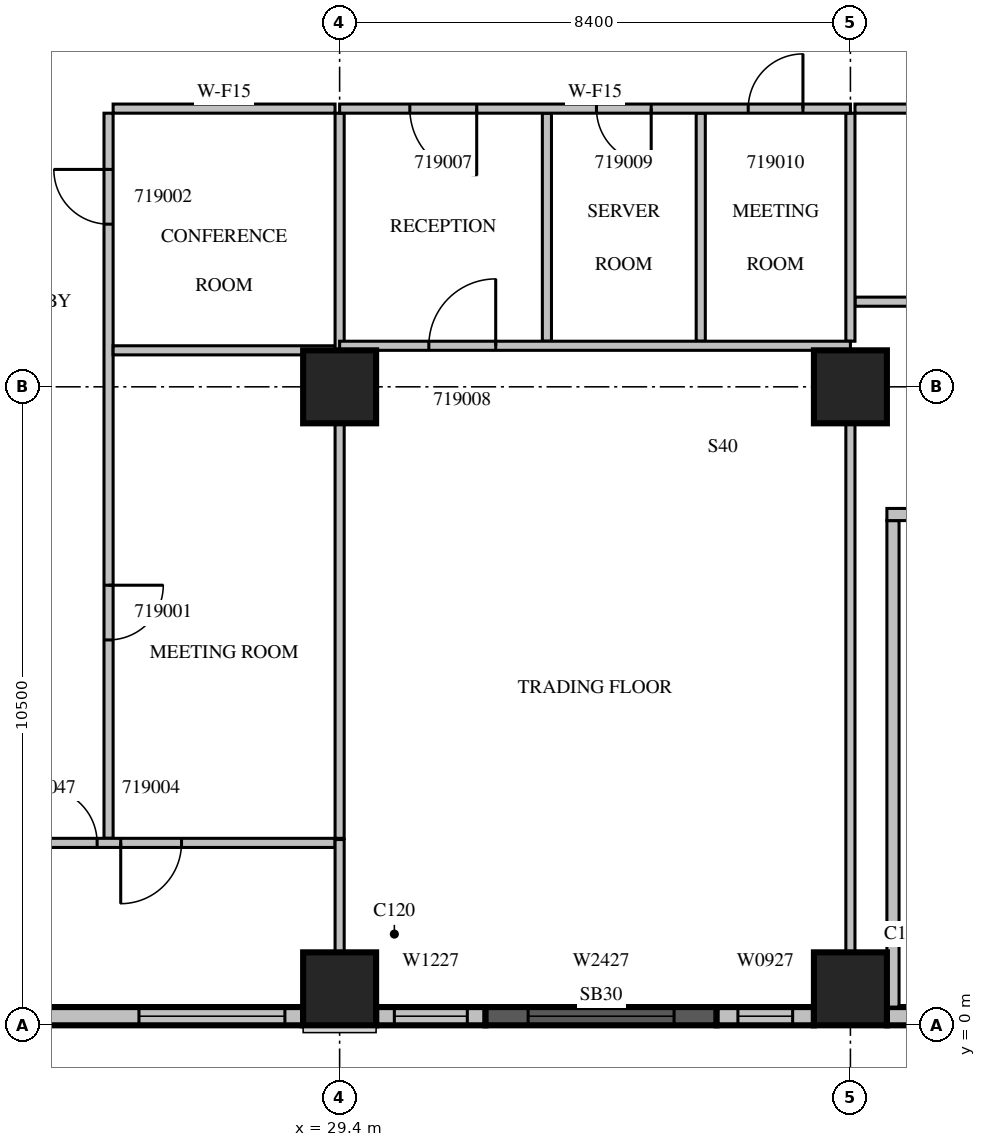
"""IFC4 building model, lengths in metres.
Left out: names, types, materials, properties, quantities, classifications, styles, units other than length and angle.
Written with IfcOpenShell. Run it as: python <this file> out.ifc"""

import sys

from ifc_helpers import new_model, si_unit, direction, frame, frame_2d, origin, origin_2d, place, context, subcontext, project, spatial, rectangle, extrude, source, transform, mapped, element, fill, save


model = new_model("IFC4")
c1 = context("Model", 3, precision=1e-05, world=origin(), true_north=direction((0.0, 1.0)))
c2 = subcontext(c1, "Body", "Model", "MODEL_VIEW")
j1 = project(units=[si_unit("LENGTHUNIT", "METRE"), si_unit("PLANEANGLEUNIT", "RADIAN")], contexts=[c1])
p1 = place(None, origin())
s1 = spatial("IfcSite", under=j1, at=p1, CompositionType="ELEMENT")
p2 = place(p1, origin())
s2 = spatial("IfcBuilding", under=s1, at=p2, CompositionType="ELEMENT")
p3 = place(p2, frame((0.0, 0.0, 90.9)))
s3 = spatial("IfcBuildingStorey", under=s2, at=p3, CompositionType="ELEMENT", Elevation=90.9)
m1 = source(origin(), c2, "Body", "SweptSolid", [
    extrude(rectangle(XDim=1.2, YDim=1.2, at=origin_2d()), origin(), (0.0, 0.0, 1.0), 4.2),
])
for number, where, z_axis, x_axis in (
    (1, (29.4, 0.6, 0.0), (0.0, 0.0, 1.0), (1.0, 0.0, 0.0)),
    (2, (37.8, 0.6, 0.0), (0.0, 0.0, 1.0), (1.0, 0.0, 0.0)),
    (3, (29.4, 10.5, 0.0), (0.0, 0.0, 1.0), (1.0, 0.0, 0.0)),
    (4, (37.8, 10.5, 0.0), (0.0, 0.0, 1.0), (1.0, 0.0, 0.0)),
):
    element("IfcColumn", number, at=place(p3, frame(where, z_axis=z_axis, x_axis=x_axis)), inside=s3, PredefinedType="COLUMN", context=c2, shape_type="MappedRepresentation", body=[
        mapped(m1, transform((0.0, 0.0, 0.0), scale=1.0)),
    ])
m2 = source(origin(), c2, "Body", "SweptSolid", [
    extrude(rectangle(XDim=7.2, YDim=0.3, at=frame_2d((3.6, 0.0))), origin(), (0.0, 0.0, 1.0), 3.8),
])
p4 = place(p3, frame((21.6, 0.15, 0.0), z_axis=(0.0, 0.0, 1.0), x_axis=(1.0, 0.0, 0.0)))
e5 = element("IfcWall", 5, at=p4, inside=s3, PredefinedType="STANDARD", context=c2, shape_type="MappedRepresentation", body=[
    mapped(m2, transform((0.0, 0.0, 0.0), scale=1.0)),
])
m3 = source(origin(), c2, "Body", "SweptSolid", [
    extrude(rectangle(XDim=2.4, YDim=2.7, at=frame_2d((1.2, 1.35))), frame((0.0, 0.16, 0.0), z_axis=(0.0, -1.0, 0.0), x_axis=(1.0, 0.0, 0.0)), (0.0, 0.0, 1.0), 0.32),
])
p5 = place(p4, frame((0.3, 0.0, 0.6)))
e6 = element("IfcOpeningElement", 6, at=p5, cuts=e5, PredefinedType="OPENING", context=c2, shape_type="MappedRepresentation", body=[
    mapped(m3, transform((0.0, 0.0, 0.0), scale=1.0)),
])
p6 = place(p4, frame((4.5, 0.0, 0.6)))
e7 = element("IfcOpeningElement", 7, at=p6, cuts=e5, PredefinedType="OPENING", context=c2, shape_type="MappedRepresentation", body=[
    mapped(m3, transform((0.0, 0.0, 0.0), scale=1.0)),
])
m4 = source(origin(), c2, "Body", "SweptSolid", [
    extrude(rectangle(XDim=1.8, YDim=0.3, at=frame_2d((0.9, 0.0))), origin(), (0.0, 0.0, 1.0), 3.8),
])
p7 = place(p3, frame((30.0, 0.15, 0.0), z_axis=(0.0, 0.0, 1.0), x_axis=(1.0, 0.0, 0.0)))
e8 = element("IfcWall", 8, at=p7, inside=s3, PredefinedType="STANDARD", context=c2, shape_type="MappedRepresentation", body=[
    mapped(m4, transform((0.0, 0.0, 0.0), scale=1.0)),
])
m5 = source(origin(), c2, "Body", "SweptSolid", [
    extrude(rectangle(XDim=1.2, YDim=2.7, at=frame_2d((0.6, 1.35))), frame((0.0, 0.16, 0.0), z_axis=(0.0, -1.0, 0.0), x_axis=(1.0, 0.0, 0.0)), (0.0, 0.0, 1.0), 0.32),
])
p8 = place(p7, frame((0.3, 0.0, 0.6)))
e9 = element("IfcOpeningElement", 9, at=p8, cuts=e8, PredefinedType="OPENING", context=c2, shape_type="MappedRepresentation", body=[
    mapped(m5, transform((0.0, 0.0, 0.0), scale=1.0)),
])
m6 = source(origin(), c2, "Body", "SweptSolid", [
    extrude(rectangle(XDim=3.8, YDim=0.3, at=frame_2d((1.9, 0.0))), origin(), (0.0, 0.0, 1.0), 3.8),
])
p9 = place(p3, frame((31.8, 0.15, 0.0), z_axis=(0.0, 0.0, 1.0), x_axis=(1.0, 0.0, 0.0)))
e10 = element("IfcWall", 10, at=p9, inside=s3, PredefinedType="SOLIDWALL", context=c2, shape_type="MappedRepresentation", body=[
    mapped(m6, transform((0.0, 0.0, 0.0), scale=1.0)),
])
p10 = place(p9, frame((0.7, 0.0, 0.6)))
e11 = element("IfcOpeningElement", 11, at=p10, cuts=e10, PredefinedType="OPENING", context=c2, shape_type="MappedRepresentation", body=[
    mapped(m3, transform((0.0, 0.0, 0.0), scale=1.0)),
])
m7 = source(origin(), c2, "Body", "SweptSolid", [
    extrude(rectangle(XDim=1.6, YDim=0.3, at=frame_2d((0.8, 0.0))), origin(), (0.0, 0.0, 1.0), 3.8),
])
p11 = place(p3, frame((35.6, 0.15, 0.0), z_axis=(0.0, 0.0, 1.0), x_axis=(1.0, 0.0, 0.0)))
e12 = element("IfcWall", 12, at=p11, inside=s3, PredefinedType="STANDARD", context=c2, shape_type="MappedRepresentation", body=[
    mapped(m7, transform((0.0, 0.0, 0.0), scale=1.0)),
])
m8 = source(origin(), c2, "Body", "SweptSolid", [
    extrude(rectangle(XDim=0.9, YDim=2.7, at=frame_2d((0.45, 1.35))), frame((0.0, 0.16, 0.0), z_axis=(0.0, -1.0, 0.0), x_axis=(1.0, 0.0, 0.0)), (0.0, 0.0, 1.0), 0.32),
])
p12 = place(p11, frame((0.35, 0.0, 0.6)))
e13 = element("IfcOpeningElement", 13, at=p12, cuts=e12, PredefinedType="OPENING", context=c2, shape_type="MappedRepresentation", body=[
    mapped(m8, transform((0.0, 0.0, 0.0), scale=1.0)),
])
p13 = place(p3, frame((38.4, 0.15, 0.0), z_axis=(0.0, 0.0, 1.0), x_axis=(1.0, 0.0, 0.0)))
e14 = element("IfcWall", 14, at=p13, inside=s3, PredefinedType="STANDARD", context=c2, shape_type="MappedRepresentation", body=[
    mapped(m4, transform((0.0, 0.0, 0.0), scale=1.0)),
])
m9 = source(origin(), c2, "Body", "SweptSolid", [
    extrude(rectangle(XDim=8.0, YDim=0.2, at=frame_2d((4.0, 0.0))), origin(), (0.0, 0.0, 1.0), 3.8),
])
p14 = place(p3, frame((38.5, 0.3, 0.0), z_axis=(0.0, 0.0, 1.0), x_axis=(0.0, 1.0, 0.0)))
e15 = element("IfcWall", 15, at=p14, inside=s3, PredefinedType="PARTITIONING", context=c2, shape_type="MappedRepresentation", body=[
    mapped(m9, transform((0.0, 0.0, 0.0), scale=1.0)),
])
m10 = source(origin(), c2, "Body", "SweptSolid", [
    extrude(rectangle(XDim=5.45, YDim=0.2, at=frame_2d((2.725, 0.0))), origin(), (0.0, 0.0, 1.0), 3.8),
])
p15 = place(p3, frame((38.4, 8.4, 0.0), z_axis=(0.0, 0.0, 1.0), x_axis=(1.0, 0.0, 0.0)))
e16 = element("IfcWall", 16, at=p15, inside=s3, PredefinedType="PARTITIONING", context=c2, shape_type="MappedRepresentation", body=[
    mapped(m10, transform((0.0, 0.0, 0.0), scale=1.0)),
])
m11 = source(origin(), c2, "Body", "SweptSolid", [
    extrude(rectangle(XDim=1.2, YDim=2.1, at=frame_2d((0.6, 1.05))), frame((0.0, 0.11, 0.0), z_axis=(0.0, -1.0, 0.0), x_axis=(1.0, 0.0, 0.0)), (0.0, 0.0, 1.0), 0.22),
])
p16 = place(p15, frame((0.4, 0.0, 0.0)))
e17 = element("IfcOpeningElement", 17, at=p16, cuts=e16, PredefinedType="OPENING", context=c2, shape_type="MappedRepresentation", body=[
    mapped(m11, transform((0.0, 0.0, 0.0), scale=1.0)),
])
m12 = source(origin(), c2, "Body", "SweptSolid", [
    extrude(rectangle(XDim=0.9, YDim=2.1, at=frame_2d((0.45, 1.05))), frame((0.0, 0.11, 0.0), z_axis=(0.0, -1.0, 0.0), x_axis=(1.0, 0.0, 0.0)), (0.0, 0.0, 1.0), 0.22),
])
p17 = place(p15, frame((3.25, 0.0, 0.0)))
e18 = element("IfcOpeningElement", 18, at=p17, cuts=e16, PredefinedType="OPENING", context=c2, shape_type="MappedRepresentation", body=[
    mapped(m12, transform((0.0, 0.0, 0.0), scale=1.0)),
])
m13 = source(origin(), c2, "Body", "SweptSolid", [
    extrude(rectangle(XDim=11.925, YDim=0.15, at=frame_2d((5.963, 0.0))), origin(), (0.0, 0.0, 1.0), 3.8),
])
p18 = place(p3, frame((25.6, 15.0, 0.0), z_axis=(0.0, 0.0, 1.0), x_axis=(0.0, -1.0, 0.0)))
e19 = element("IfcWall", 19, at=p18, inside=s3, PredefinedType="PARTITIONING", context=c2, shape_type="MappedRepresentation", body=[
    mapped(m13, transform((0.0, 0.0, 0.0), scale=1.0)),
])
m14 = source(origin(), c2, "Body", "SweptSolid", [
    extrude(rectangle(XDim=0.9, YDim=2.1, at=frame_2d((0.45, 1.05))), frame((0.0, 0.085, 0.0), z_axis=(0.0, -1.0, 0.0), x_axis=(1.0, 0.0, 0.0)), (0.0, 0.0, 1.0), 0.17),
])
p19 = place(p18, frame((7.763, 0.0, 0.0)))
e20 = element("IfcOpeningElement", 20, at=p19, cuts=e19, PredefinedType="OPENING", context=c2, shape_type="MappedRepresentation", body=[
    mapped(m14, transform((0.0, 0.0, 0.0), scale=1.0)),
])
p20 = place(p18, frame((0.925, 0.0, 0.0)))
e21 = element("IfcOpeningElement", 21, at=p20, cuts=e19, PredefinedType="OPENING", context=c2, shape_type="MappedRepresentation", body=[
    mapped(m14, transform((0.0, 0.0, 0.0), scale=1.0)),
])
p21 = place(p3, frame((29.325, 11.1, 0.0), z_axis=(0.0, 0.0, 1.0), x_axis=(-1.0, 0.0, 0.0)))
e22 = element("IfcWall", 22, at=p21, inside=s3, PredefinedType="PARTITIONING", context=c2, shape_type="SweptSolid", body=[
    extrude(rectangle(XDim=3.65, YDim=0.15, at=frame_2d((1.825, 0.0))), origin(), (0.0, 0.0, 1.0), 3.8),
])
m15 = source(origin(), c2, "Body", "SweptSolid", [
    extrude(rectangle(XDim=3.65, YDim=0.15, at=frame_2d((1.825, 0.0))), origin(), (0.0, 0.0, 1.0), 3.8),
])
p22 = place(p3, frame((29.325, 15.075, 0.0), z_axis=(0.0, 0.0, 1.0), x_axis=(-1.0, 0.0, 0.0)))
e23 = element("IfcWall", 23, at=p22, inside=s3, PredefinedType="PARTITIONING", context=c2, shape_type="MappedRepresentation", body=[
    mapped(m15, transform((0.0, 0.0, 0.0), scale=1.0)),
])
m16 = source(origin(), c2, "Body", "SweptSolid", [
    extrude(rectangle(XDim=6.826, YDim=0.15, at=frame_2d((3.413, 0.0))), origin(), (0.0, 0.0, 1.0), 3.8),
])
p23 = place(p3, frame((29.4, 3.075, 0.0), z_axis=(0.0, 0.0, 1.0), x_axis=(0.0, 1.0, 0.0)))
e24 = element("IfcWall", 24, at=p23, inside=s3, PredefinedType="PARTITIONING", context=c2, shape_type="MappedRepresentation", body=[
    mapped(m16, transform((0.0, 0.0, 0.0), scale=1.0)),
])
m17 = source(origin(), c2, "Body", "SweptSolid", [
    extrude(rectangle(XDim=3.901, YDim=0.15, at=frame_2d((1.95, 0.0))), origin(), (0.0, 0.0, 1.0), 3.8),
])
p24 = place(p3, frame((29.4, 11.099, 0.0), z_axis=(0.0, 0.0, 1.0), x_axis=(0.0, 1.0, 0.0)))
e25 = element("IfcWall", 25, at=p24, inside=s3, PredefinedType="PARTITIONING", context=c2, shape_type="MappedRepresentation", body=[
    mapped(m17, transform((0.0, 0.0, 0.0), scale=1.0)),
])
m18 = source(origin(), c2, "Body", "SweptSolid", [
    extrude(rectangle(XDim=7.125, YDim=0.15, at=frame_2d((3.562, 0.0))), origin(), (0.0, 0.0, 1.0), 3.8),
])
p25 = place(p3, frame((22.2, 3.0, 0.0), z_axis=(0.0, 0.0, 1.0), x_axis=(1.0, 0.0, 0.0)))
e26 = element("IfcWall", 26, at=p25, inside=s3, PredefinedType="PARTITIONING", context=c2, shape_type="MappedRepresentation", body=[
    mapped(m18, transform((0.0, 0.0, 0.0), scale=1.0)),
])
m19 = source(origin(), c2, "Body", "SweptSolid", [
    extrude(rectangle(XDim=1.0, YDim=2.1, at=frame_2d((0.5, 1.05))), frame((0.0, 0.085, 0.0), z_axis=(0.0, -1.0, 0.0), x_axis=(1.0, 0.0, 0.0)), (0.0, 0.0, 1.0), 0.17),
])
p26 = place(p25, frame((3.6, 0.0, 0.0)))
e27 = element("IfcOpeningElement", 27, at=p26, cuts=e26, PredefinedType="OPENING", context=c2, shape_type="MappedRepresentation", body=[
    mapped(m19, transform((0.0, 0.0, 0.0), scale=1.0)),
])
p27 = place(p25, frame((2.312, 0.0, 0.0)))
e28 = element("IfcOpeningElement", 28, at=p27, cuts=e26, PredefinedType="OPENING", context=c2, shape_type="MappedRepresentation", body=[
    mapped(m14, transform((0.0, 0.0, 0.0), scale=1.0)),
])
m20 = source(origin(), c2, "Body", "SweptSolid", [
    extrude(rectangle(XDim=6.45, YDim=0.15, at=frame_2d((3.225, 0.0))), origin(), (0.0, 0.0, 1.0), 3.8),
])
p28 = place(p3, frame((37.875, 11.9, 0.0), z_axis=(0.0, 0.0, 1.0), x_axis=(1.0, 0.0, 0.0)))
e29 = element("IfcWall", 29, at=p28, inside=s3, PredefinedType="PARTITIONING", context=c2, shape_type="MappedRepresentation", body=[
    mapped(m20, transform((0.0, 0.0, 0.0), scale=1.0)),
])
p29 = place(p3, frame((44.325, 15.075, 0.0), z_axis=(0.0, 0.0, 1.0), x_axis=(-1.0, 0.0, 0.0)))
e30 = element("IfcWall", 30, at=p29, inside=s3, PredefinedType="PARTITIONING", context=c2, shape_type="MappedRepresentation", body=[
    mapped(m20, transform((0.0, 0.0, 0.0), scale=1.0)),
])
p30 = place(p29, frame((2.812, 0.0, 0.0)))
e31 = element("IfcOpeningElement", 31, at=p30, cuts=e30, PredefinedType="OPENING", context=c2, shape_type="MappedRepresentation", body=[
    mapped(m14, transform((0.0, 0.0, 0.0), scale=1.0)),
])
m21 = source(origin(), c2, "Body", "SweptSolid", [
    extrude(rectangle(XDim=3.75, YDim=0.15, at=frame_2d((1.875, 0.0))), origin(), (0.0, 0.0, 1.0), 3.8),
])
for number, where, z_axis, x_axis in (
    (32, (32.809, 11.25, 0.0), (0.0, 0.0, 1.0), (0.0, 1.0, 0.0)),
    (33, (35.339, 11.25, 0.0), (0.0, 0.0, 1.0), (0.0, 1.0, 0.0)),
):
    element("IfcWall", number, at=place(p3, frame(where, z_axis=z_axis, x_axis=x_axis)), inside=s3, PredefinedType="PARTITIONING", context=c2, shape_type="MappedRepresentation", body=[
        mapped(m21, transform((0.0, 0.0, 0.0), scale=1.0)),
    ])
m22 = source(origin(), c2, "Body", "SweptSolid", [
    extrude(rectangle(XDim=1.856, YDim=0.15, at=frame_2d((0.928, 0.0))), origin(), (0.0, 0.0, 1.0), 3.8),
])
p31 = place(p3, frame((29.4, 1.199, 0.0), z_axis=(0.0, 0.0, 1.0), x_axis=(0.0, 1.0, 0.0)))
e34 = element("IfcWall", 34, at=p31, inside=s3, PredefinedType="PARTITIONING", context=c2, shape_type="MappedRepresentation", body=[
    mapped(m22, transform((0.0, 0.0, 0.0), scale=1.0)),
])
m23 = source(origin(), c2, "Body", "SweptSolid", [
    extrude(rectangle(XDim=8.702, YDim=0.15, at=frame_2d((4.351, 0.0))), origin(), (0.0, 0.0, 1.0), 3.8),
])
p32 = place(p3, frame((37.8, 1.199, 0.0), z_axis=(0.0, 0.0, 1.0), x_axis=(0.0, 1.0, 0.0)))
e35 = element("IfcWall", 35, at=p32, inside=s3, PredefinedType="PARTITIONING", context=c2, shape_type="MappedRepresentation", body=[
    mapped(m23, transform((0.0, 0.0, 0.0), scale=1.0)),
])
p33 = place(p3, frame((37.8, 11.25, 0.0), z_axis=(0.0, 0.0, 1.0), x_axis=(0.0, 1.0, 0.0)))
e36 = element("IfcWall", 36, at=p33, inside=s3, PredefinedType="PARTITIONING", context=c2, shape_type="MappedRepresentation", body=[
    mapped(m21, transform((0.0, 0.0, 0.0), scale=1.0)),
])
m24 = source(origin(), c2, "Body", "SweptSolid", [
    extrude(rectangle(XDim=8.4, YDim=0.15, at=frame_2d((4.2, 0.0))), origin(), (0.0, 0.0, 1.0), 3.8),
])
p34 = place(p3, frame((37.8, 11.175, 0.0), z_axis=(0.0, 0.0, 1.0), x_axis=(-1.0, 0.0, 0.0)))
e37 = element("IfcWall", 37, at=p34, inside=s3, PredefinedType="PARTITIONING", context=c2, shape_type="MappedRepresentation", body=[
    mapped(m24, transform((0.0, 0.0, 0.0), scale=1.0)),
])
m25 = source(origin(), c2, "Body", "SweptSolid", [
    extrude(rectangle(XDim=1.1, YDim=2.1, at=frame_2d((0.55, 1.05))), frame((0.0, 0.085, 0.0), z_axis=(0.0, -1.0, 0.0), x_axis=(1.0, 0.0, 0.0)), (0.0, 0.0, 1.0), 0.17),
])
p35 = place(p34, frame((5.833, 0.0, 0.0)))
e38 = element("IfcOpeningElement", 38, at=p35, cuts=e37, PredefinedType="OPENING", context=c2, shape_type="MappedRepresentation", body=[
    mapped(m25, transform((0.0, 0.0, 0.0), scale=1.0)),
])
p36 = place(p3, frame((37.8, 15.075, 0.0), z_axis=(0.0, 0.0, 1.0), x_axis=(-1.0, 0.0, 0.0)))
e39 = element("IfcWall", 39, at=p36, inside=s3, PredefinedType="PARTITIONING", context=c2, shape_type="MappedRepresentation", body=[
    mapped(m24, transform((0.0, 0.0, 0.0), scale=1.0)),
])
p37 = place(p36, frame((6.146, 0.0, 0.0)))
e40 = element("IfcOpeningElement", 40, at=p37, cuts=e39, PredefinedType="OPENING", context=c2, shape_type="MappedRepresentation", body=[
    mapped(m25, transform((0.0, 0.0, 0.0), scale=1.0)),
])
p38 = place(p36, frame((3.276, 0.0, 0.0)))
e41 = element("IfcOpeningElement", 41, at=p38, cuts=e39, PredefinedType="OPENING", context=c2, shape_type="MappedRepresentation", body=[
    mapped(m14, transform((0.0, 0.0, 0.0), scale=1.0)),
])
p39 = place(p36, frame((0.781, 0.0, 0.0)))
e42 = element("IfcOpeningElement", 42, at=p39, cuts=e39, PredefinedType="OPENING", context=c2, shape_type="MappedRepresentation", body=[
    mapped(m14, transform((0.0, 0.0, 0.0), scale=1.0)),
])
m26 = source(origin(), c2, "Body", "SweptSolid", [
    extrude(rectangle(XDim=2.4, YDim=2.7, at=frame_2d((1.2, 1.35))), frame((0.0, 0.03, 0.0), z_axis=(0.0, -1.0, 0.0), x_axis=(1.0, 0.0, 0.0)), (0.0, 0.0, 1.0), 0.06),
])
p40 = place(p6, origin())
e43 = element("IfcWindow", 43, at=p40, inside=s3, PartitioningType="SINGLE_PANEL", PredefinedType="WINDOW", context=c2, shape_type="MappedRepresentation", body=[
    mapped(m26, transform((0.0, 0.0, 0.0), scale=1.0)),
])
fill(e7, e43)
m27 = source(origin(), c2, "Body", "SweptSolid", [
    extrude(rectangle(XDim=1.2, YDim=2.7, at=frame_2d((0.6, 1.35))), frame((0.0, 0.03, 0.0), z_axis=(0.0, -1.0, 0.0), x_axis=(1.0, 0.0, 0.0)), (0.0, 0.0, 1.0), 0.06),
])
p41 = place(p8, origin())
e44 = element("IfcWindow", 44, at=p41, inside=s3, PartitioningType="SINGLE_PANEL", PredefinedType="WINDOW", context=c2, shape_type="MappedRepresentation", body=[
    mapped(m27, transform((0.0, 0.0, 0.0), scale=1.0)),
])
fill(e9, e44)
p42 = place(p10, origin())
e45 = element("IfcWindow", 45, at=p42, inside=s3, PartitioningType="SINGLE_PANEL", PredefinedType="WINDOW", context=c2, shape_type="MappedRepresentation", body=[
    mapped(m26, transform((0.0, 0.0, 0.0), scale=1.0)),
])
fill(e11, e45)
m28 = source(origin(), c2, "Body", "SweptSolid", [
    extrude(rectangle(XDim=0.9, YDim=2.7, at=frame_2d((0.45, 1.35))), frame((0.0, 0.03, 0.0), z_axis=(0.0, -1.0, 0.0), x_axis=(1.0, 0.0, 0.0)), (0.0, 0.0, 1.0), 0.06),
])
p43 = place(p12, origin())
e46 = element("IfcWindow", 46, at=p43, inside=s3, PartitioningType="SINGLE_PANEL", PredefinedType="WINDOW", context=c2, shape_type="MappedRepresentation", body=[
    mapped(m28, transform((0.0, 0.0, 0.0), scale=1.0)),
])
fill(e13, e46)
m29 = source(origin(), c2, "Body", "SweptSolid", [
    extrude(rectangle(XDim=0.9, YDim=2.1, at=frame_2d((0.45, 1.05))), frame((0.0, 0.025, 0.0), z_axis=(0.0, -1.0, 0.0), x_axis=(1.0, 0.0, 0.0)), (0.0, 0.0, 1.0), 0.05),
])
p44 = place(p19, origin())
e47 = element("IfcDoor", 47, at=p44, inside=s3, OperationType="SINGLE_SWING_LEFT", PredefinedType="DOOR", context=c2, shape_type="MappedRepresentation", body=[
    mapped(m29, transform((0.0, 0.0, 0.0), scale=1.0)),
])
fill(e20, e47)
p45 = place(p20, origin())
e48 = element("IfcDoor", 48, at=p45, inside=s3, OperationType="SINGLE_SWING_RIGHT", PredefinedType="DOOR", context=c2, shape_type="MappedRepresentation", body=[
    mapped(m29, transform((0.0, 0.0, 0.0), scale=1.0)),
])
fill(e21, e48)
m30 = source(origin(), c2, "Body", "SweptSolid", [
    extrude(rectangle(XDim=1.0, YDim=2.1, at=frame_2d((0.5, 1.05))), frame((0.0, 0.025, 0.0), z_axis=(0.0, -1.0, 0.0), x_axis=(1.0, 0.0, 0.0)), (0.0, 0.0, 1.0), 0.05),
])
p46 = place(p26, origin())
e49 = element("IfcDoor", 49, at=p46, inside=s3, OperationType="SINGLE_SWING_RIGHT", PredefinedType="DOOR", context=c2, shape_type="MappedRepresentation", body=[
    mapped(m30, transform((0.0, 0.0, 0.0), scale=1.0)),
])
fill(e27, e49)
m31 = source(origin(), c2, "Body", "SweptSolid", [
    extrude(rectangle(XDim=1.1, YDim=2.1, at=frame_2d((0.55, 1.05))), frame((0.0, 0.025, 0.0), z_axis=(0.0, -1.0, 0.0), x_axis=(1.0, 0.0, 0.0)), (0.0, 0.0, 1.0), 0.05),
])
p47 = place(p37, origin())
e50 = element("IfcDoor", 50, at=p47, inside=s3, OperationType="SINGLE_SWING_LEFT", PredefinedType="DOOR", context=c2, shape_type="MappedRepresentation", body=[
    mapped(m31, transform((0.0, 0.0, 0.0), scale=1.0)),
])
fill(e40, e50)
p48 = place(p35, origin())
e51 = element("IfcDoor", 51, at=p48, inside=s3, OperationType="SINGLE_SWING_RIGHT", PredefinedType="DOOR", context=c2, shape_type="MappedRepresentation", body=[
    mapped(m31, transform((0.0, 0.0, 0.0), scale=1.0)),
])
fill(e38, e51)
p49 = place(p38, origin())
e52 = element("IfcDoor", 52, at=p49, inside=s3, OperationType="SINGLE_SWING_LEFT", PredefinedType="DOOR", context=c2, shape_type="MappedRepresentation", body=[
    mapped(m29, transform((0.0, 0.0, 0.0), scale=1.0)),
])
fill(e41, e52)
p50 = place(p39, origin())
e53 = element("IfcDoor", 53, at=p50, inside=s3, OperationType="SINGLE_SWING_RIGHT", PredefinedType="DOOR", context=c2, shape_type="MappedRepresentation", body=[
    mapped(m29, transform((0.0, 0.0, 0.0), scale=1.0)),
])
fill(e42, e53)
p51 = place(p27, origin())
e54 = element("IfcDoor", 54, at=p51, inside=s3, OperationType="SINGLE_SWING_LEFT", PredefinedType="DOOR", context=c2, shape_type="MappedRepresentation", body=[
    mapped(m29, transform((0.0, 0.0, 0.0), scale=1.0)),
])
fill(e28, e54)
save(model, sys.argv[1])
